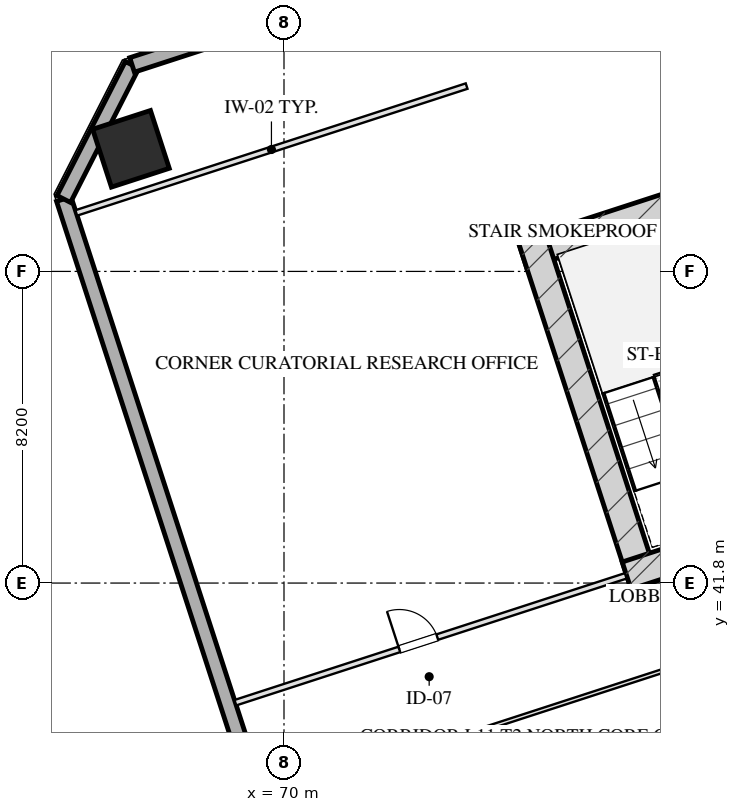
"""IFC4 building model, lengths in metres.
Left out: names, types, materials, properties, quantities, classifications, styles, units other than length and angle.
Written with IfcOpenShell. Run it as: python <this file> out.ifc"""

import sys

from ifc_helpers import new_model, si_unit, direction, frame, frame_2d, origin, origin_2d, place, context, subcontext, project, spatial, rectangle, hollow_rectangle, extrude, element, fill, save


model = new_model("IFC4")
c1 = context("Model", 3, precision=1e-05, world=origin(), true_north=direction((0.0, 1.0)))
c2 = subcontext(c1, "Body", "Model", "MODEL_VIEW")
j1 = project(units=[si_unit("LENGTHUNIT", "METRE"), si_unit("PLANEANGLEUNIT", "RADIAN")], contexts=[c1])
p1 = place(None, origin())
s1 = spatial("IfcSite", under=j1, at=p1, CompositionType="ELEMENT")
p2 = place(p1, origin())
s2 = spatial("IfcBuilding", under=s1, at=p2, CompositionType="ELEMENT")
p3 = place(p2, frame((0.0, 0.0, 50.6)))
s3 = spatial("IfcBuildingStorey", under=s2, at=p3, CompositionType="ELEMENT", Elevation=50.6)
p4 = place(p3, frame((76.272, 50.443, 0.0), z_axis=(0.0, 0.0, 1.0), x_axis=(0.951056072937, 0.309018358888, 0.0)))
e1 = element("IfcWall", 1, at=p4, inside=s3, PredefinedType="SHEAR", context=c2, shape_type="SweptSolid", body=[
    extrude(rectangle(XDim=16.55, YDim=0.75, at=frame_2d((8.275, 0.0))), origin(), (0.0, 0.0, 1.0), 3.45),
])
p5 = place(p3, frame((79.489, 41.756, 0.0), z_axis=(0.0, 0.0, 1.0), x_axis=(-0.309016134813, 0.951056795583, 0.0)))
e2 = element("IfcWall", 2, at=p5, inside=s3, PredefinedType="SHEAR", context=c2, shape_type="SweptSolid", body=[
    extrude(rectangle(XDim=9.63, YDim=0.75, at=frame_2d((4.815, 0.0))), origin(), (0.0, 0.0, 1.0), 3.45),
])
p6 = place(p3, frame((79.016, 41.997, 0.0), z_axis=(0.0, 0.0, 1.0), x_axis=(0.95106038264, 0.309005094736, 0.0)))
e3 = element("IfcWall", 3, at=p6, inside=s3, PredefinedType="SHEAR", context=c2, shape_type="SweptSolid", body=[
    extrude(rectangle(XDim=4.295, YDim=0.75, at=frame_2d((2.147, 0.0))), origin(), (0.0, 0.0, 1.0), 3.45),
])
p7 = place(p3, frame((65.973, 53.226, 0.0), z_axis=(0.0, 0.0, 1.0), x_axis=(0.951056516295, 0.309016994375, 0.0)))
e4 = element("IfcColumn", 4, at=p7, inside=s3, PredefinedType="COLUMN", context=c2, shape_type="SweptSolid", body=[
    extrude(hollow_rectangle(XDim=1.6, YDim=1.6, WallThickness=0.055, at=origin_2d()), origin(), (0.0, 0.0, 1.0), 3.451),
])
p8 = place(p3, frame((79.655, 4.352, 0.0), z_axis=(0.0, 0.0, 1.0), x_axis=(-0.309014526607, 0.951057318118, 0.0)))
e5 = element("IfcWall", 5, at=p8, inside=s3, PredefinedType="SOLIDWALL", context=c2, shape_type="SweptSolid", body=[
    extrude(rectangle(XDim=50.0, YDim=0.4, at=frame_2d((25.0, 0.0))), origin(), (0.0, 0.0, 1.0), 2.61),
])
p9 = place(p8, frame((27.05, 0.0, 0.0)))
e6 = element("IfcOpeningElement", 6, at=p9, cuts=e5, PredefinedType="OPENING", context=c2, shape_type="SweptSolid", body=[
    extrude(rectangle(XDim=1.1, YDim=2.15, at=frame_2d((0.55, 1.075))), frame((0.0, 0.21, 0.0), z_axis=(0.0, -1.0, 0.0), x_axis=(1.0, 0.0, 0.0)), (0.0, 0.0, 1.0), 0.42),
])
p10 = place(p3, frame((64.205, 51.905, 0.0), z_axis=(0.0, 0.0, 1.0), x_axis=(0.453958106755, 0.891023028497, 0.0)))
e7 = element("IfcWall", 7, at=p10, inside=s3, PredefinedType="SOLIDWALL", context=c2, shape_type="SweptSolid", body=[
    extrude(rectangle(XDim=3.96, YDim=0.4, at=frame_2d((1.98, 0.0))), origin(), (0.0, 0.0, 1.0), 2.61),
])
p11 = place(p3, frame((66.002, 55.433, 0.0), z_axis=(0.0, 0.0, 1.0), x_axis=(0.951055939317, 0.309018770125, 0.0)))
e8 = element("IfcWall", 8, at=p11, inside=s3, PredefinedType="SOLIDWALL", context=c2, shape_type="SweptSolid", body=[
    extrude(rectangle(XDim=32.4, YDim=0.4, at=frame_2d((16.2, 0.0))), origin(), (0.0, 0.0, 1.0), 2.61),
])
p12 = place(p3, frame((64.534, 51.539, 0.0), z_axis=(0.0, 0.0, 1.0), x_axis=(0.951056658866, 0.309016555588, 0.0)))
e9 = element("IfcWall", 9, at=p12, inside=s3, PredefinedType="PARTITIONING", context=c2, shape_type="SweptSolid", body=[
    extrude(rectangle(XDim=10.8, YDim=0.15, at=frame_2d((5.4, 0.0))), origin(), (0.0, 0.0, 1.0), 3.175),
])
p13 = place(p3, frame((68.721, 38.652, 0.0), z_axis=(0.0, 0.0, 1.0), x_axis=(0.951056658866, 0.309016555588, 0.0)))
e10 = element("IfcWall", 10, at=p13, inside=s3, PredefinedType="PARTITIONING", context=c2, shape_type="SweptSolid", body=[
    extrude(rectangle(XDim=10.8, YDim=0.15, at=frame_2d((5.4, 0.0))), origin(), (0.0, 0.0, 1.0), 3.175),
])
p14 = place(p13, frame((4.536, 0.0, 0.0)))
e11 = element("IfcOpeningElement", 11, at=p14, cuts=e10, PredefinedType="OPENING", context=c2, shape_type="SweptSolid", body=[
    extrude(rectangle(XDim=1.05, YDim=2.05, at=frame_2d((0.525, 1.025))), frame((0.0, 0.085, 0.0), z_axis=(0.0, -1.0, 0.0), x_axis=(1.0, 0.0, 0.0)), (0.0, 0.0, 1.0), 0.17),
])
for number, where, z_axis, x_axis in (
    (12, (69.549, 36.103, 0.0), (0.0, 0.0, 1.0), (0.951, 0.309, 0.0)),
    (13, (70.575, 32.946, 0.0), (0.0, 0.0, 1.0), (0.951, 0.309, 0.0)),
):
    element("IfcWall", number, at=place(p3, frame(where, z_axis=z_axis, x_axis=x_axis)), inside=s3, PredefinedType="MOVABLE", context=c2, shape_type="SweptSolid", body=[
        extrude(rectangle(XDim=18.075, YDim=0.1, at=frame_2d((9.038, 0.0))), origin(), (0.0, 0.0, 1.0), 3.175),
    ])
p15 = place(p14, origin())
e14 = element("IfcDoor", 14, at=p15, inside=s3, OperationType="SINGLE_SWING_LEFT", PredefinedType="DOOR", context=c2, shape_type="SweptSolid", body=[
    extrude(rectangle(XDim=1.05, YDim=2.05, at=frame_2d((0.525, 1.025))), frame((0.0, 0.025, 0.0), z_axis=(0.0, -1.0, 0.0), x_axis=(1.0, 0.0, 0.0)), (0.0, 0.0, 1.0), 0.05),
])
fill(e11, e14)
save(model, sys.argv[1])
